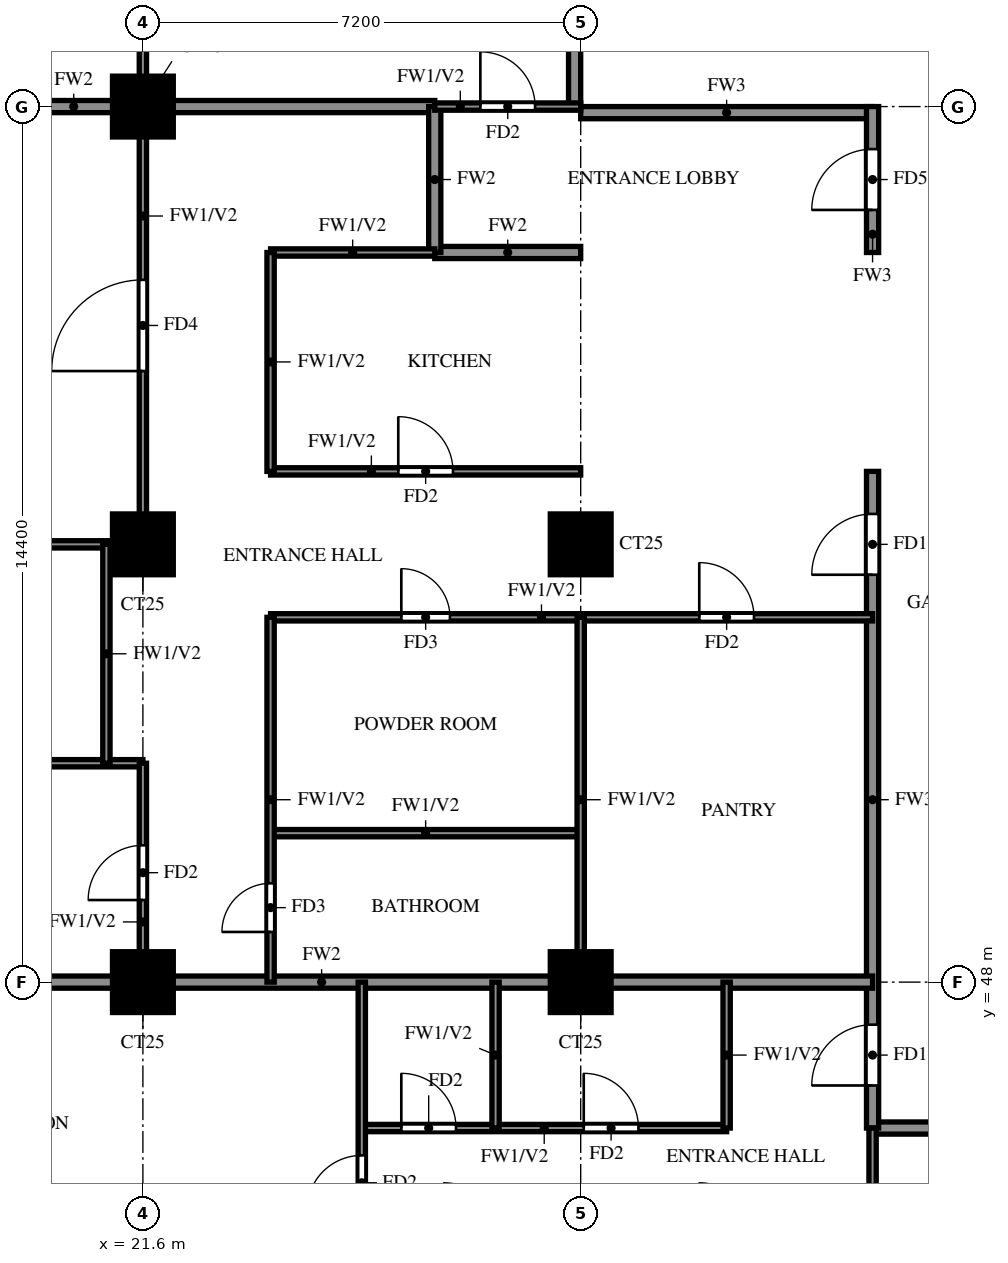
"""IFC4 building model, lengths in metres.
Left out: names, types, materials, properties, quantities, classifications, styles, units other than length and angle.
Written with IfcOpenShell. Run it as: python <this file> out.ifc"""

import sys

from ifc_helpers import new_model, si_unit, direction, frame, frame_2d, origin, origin_2d, place, context, subcontext, project, spatial, rectangle, extrude, source, transform, mapped, element, fill, save


model = new_model("IFC4")
c1 = context("Model", 3, precision=1e-05, world=origin(), true_north=direction((0.0, 1.0)))
c2 = subcontext(c1, "Body", "Model", "MODEL_VIEW")
j1 = project(units=[si_unit("LENGTHUNIT", "METRE"), si_unit("PLANEANGLEUNIT", "RADIAN")], contexts=[c1])
p1 = place(None, origin())
s1 = spatial("IfcSite", under=j1, at=p1, CompositionType="ELEMENT")
p2 = place(p1, origin())
s2 = spatial("IfcBuilding", under=s1, at=p2, CompositionType="ELEMENT")
p3 = place(p2, frame((0.0, 0.0, 171.0)))
s3 = spatial("IfcBuildingStorey", under=s2, at=p3, CompositionType="ELEMENT", Elevation=171.0)
m1 = source(origin(), c2, "Body", "SweptSolid", [
    extrude(rectangle(XDim=1.0, YDim=1.0, at=origin_2d()), origin(), (0.0, 0.0, 1.0), 3.2),
])
for number, where, z_axis, x_axis in (
    (1, (21.6, 48.0, 0.0), (0.0, 0.0, 1.0), (1.0, 0.0, 0.0)),
    (2, (28.8, 48.0, 0.0), (0.0, 0.0, 1.0), (1.0, 0.0, 0.0)),
    (3, (21.6, 55.2, 0.0), (0.0, 0.0, 1.0), (1.0, 0.0, 0.0)),
    (4, (28.8, 55.2, 0.0), (0.0, 0.0, 1.0), (1.0, 0.0, 0.0)),
    (5, (21.6, 62.4, 0.0), (0.0, 0.0, 1.0), (1.0, 0.0, 0.0)),
):
    element("IfcColumn", number, at=place(p3, frame(where, z_axis=z_axis, x_axis=x_axis)), inside=s3, PredefinedType="COLUMN", context=c2, shape_type="MappedRepresentation", body=[
        mapped(m1, transform((0.0, 0.0, 0.0))),
    ])
p4 = place(p3, frame((33.6, 45.6, 0.0), z_axis=(0.0, 0.0, 1.0), x_axis=(1.0, 0.0, 0.0)))
e6 = element("IfcWall", 6, at=p4, inside=s3, PredefinedType="SOLIDWALL", context=c2, shape_type="SweptSolid", body=[
    extrude(rectangle(XDim=7.2, YDim=0.2, at=frame_2d((3.6, 0.0))), origin(), (0.0, 0.0, 1.0), 3.2),
])
p5 = place(p4, frame((3.15, 0.0, 0.0)))
e7 = element("IfcOpeningElement", 7, at=p5, cuts=e6, PredefinedType="OPENING", context=c2, shape_type="SweptSolid", body=[
    extrude(rectangle(XDim=0.9, YDim=2.1, at=frame_2d((0.45, 1.05))), frame((0.0, 0.11, 0.0), z_axis=(0.0, -1.0, 0.0), x_axis=(1.0, 0.0, 0.0)), (0.0, 0.0, 1.0), 0.22),
])
p6 = place(p3, frame((28.8, 62.3, 0.0), z_axis=(0.0, 0.0, 1.0), x_axis=(1.0, 0.0, 0.0)))
e8 = element("IfcWall", 8, at=p6, inside=s3, PredefinedType="SOLIDWALL", context=c2, shape_type="SweptSolid", body=[
    extrude(rectangle(XDim=4.8, YDim=0.2, at=frame_2d((2.4, 0.0))), origin(), (0.0, 0.0, 1.0), 3.2),
])
p7 = place(p3, frame((28.7, 62.4, 0.0), z_axis=(0.0, 0.0, 1.0), x_axis=(0.0, 1.0, 0.0)))
e9 = element("IfcWall", 9, at=p7, inside=s3, PredefinedType="SOLIDWALL", context=c2, shape_type="SweptSolid", body=[
    extrude(rectangle(XDim=15.6, YDim=0.2, at=frame_2d((7.8, 0.0))), origin(), (0.0, 0.0, 1.0), 3.2),
])
p8 = place(p3, frame((33.6, 45.6, 0.0), z_axis=(0.0, 0.0, 1.0), x_axis=(0.0, 1.0, 0.0)))
e10 = element("IfcWall", 10, at=p8, inside=s3, PredefinedType="SOLIDWALL", context=c2, shape_type="SweptSolid", body=[
    extrude(rectangle(XDim=10.8, YDim=0.2, at=frame_2d((5.4, 0.0))), origin(), (0.0, 0.0, 1.0), 3.2),
])
p9 = place(p8, frame((0.7, 0.0, 0.0)))
e11 = element("IfcOpeningElement", 11, at=p9, cuts=e10, PredefinedType="OPENING", context=c2, shape_type="SweptSolid", body=[
    extrude(rectangle(XDim=1.0, YDim=2.1, at=frame_2d((0.5, 1.05))), frame((0.0, 0.11, 0.0), z_axis=(0.0, -1.0, 0.0), x_axis=(1.0, 0.0, 0.0)), (0.0, 0.0, 1.0), 0.22),
])
p10 = place(p8, frame((9.1, 0.0, 0.0)))
e12 = element("IfcOpeningElement", 12, at=p10, cuts=e10, PredefinedType="OPENING", context=c2, shape_type="SweptSolid", body=[
    extrude(rectangle(XDim=1.0, YDim=2.1, at=frame_2d((0.5, 1.05))), frame((0.0, 0.11, 0.0), z_axis=(0.0, -1.0, 0.0), x_axis=(1.0, 0.0, 0.0)), (0.0, 0.0, 1.0), 0.22),
])
p11 = place(p3, frame((33.6, 60.0, 0.0), z_axis=(0.0, 0.0, 1.0), x_axis=(0.0, 1.0, 0.0)))
e13 = element("IfcWall", 13, at=p11, inside=s3, PredefinedType="SOLIDWALL", context=c2, shape_type="SweptSolid", body=[
    extrude(rectangle(XDim=2.4, YDim=0.2, at=frame_2d((1.2, 0.0))), origin(), (0.0, 0.0, 1.0), 3.2),
])
p12 = place(p11, frame((0.7, 0.0, 0.0)))
e14 = element("IfcOpeningElement", 14, at=p12, cuts=e13, PredefinedType="OPENING", context=c2, shape_type="SweptSolid", body=[
    extrude(rectangle(XDim=1.0, YDim=2.1, at=frame_2d((0.5, 1.05))), frame((0.0, 0.11, 0.0), z_axis=(0.0, -1.0, 0.0), x_axis=(1.0, 0.0, 0.0)), (0.0, 0.0, 1.0), 0.22),
])
p13 = place(p3, frame((14.525, 48.0, 0.0), z_axis=(0.0, 0.0, 1.0), x_axis=(1.0, 0.0, 0.0)))
e15 = element("IfcWall", 15, at=p13, inside=s3, PredefinedType="SOLIDWALL", context=c2, shape_type="SweptSolid", body=[
    extrude(rectangle(XDim=19.075, YDim=0.2, at=frame_2d((9.538, 0.0))), origin(), (0.0, 0.0, 1.0), 3.2),
])
p14 = place(p3, frame((26.4, 60.0, 0.0), z_axis=(0.0, 0.0, 1.0), x_axis=(1.0, 0.0, 0.0)))
e16 = element("IfcWall", 16, at=p14, inside=s3, PredefinedType="SOLIDWALL", context=c2, shape_type="SweptSolid", body=[
    extrude(rectangle(XDim=2.4, YDim=0.2, at=frame_2d((1.2, 0.0))), origin(), (0.0, 0.0, 1.0), 3.2),
])
p15 = place(p3, frame((14.525, 62.4, 0.0), z_axis=(0.0, 0.0, 1.0), x_axis=(1.0, 0.0, 0.0)))
e17 = element("IfcWall", 17, at=p15, inside=s3, PredefinedType="SOLIDWALL", context=c2, shape_type="SweptSolid", body=[
    extrude(rectangle(XDim=11.875, YDim=0.2, at=frame_2d((5.938, 0.0))), origin(), (0.0, 0.0, 1.0), 3.2),
])
p16 = place(p3, frame((26.4, 60.0, 0.0), z_axis=(0.0, 0.0, 1.0), x_axis=(0.0, 1.0, 0.0)))
e18 = element("IfcWall", 18, at=p16, inside=s3, PredefinedType="SOLIDWALL", context=c2, shape_type="SweptSolid", body=[
    extrude(rectangle(XDim=2.4, YDim=0.2, at=frame_2d((1.2, 0.0))), origin(), (0.0, 0.0, 1.0), 3.2),
])
p17 = place(p3, frame((25.2, 45.6, 0.0), z_axis=(0.0, 0.0, 1.0), x_axis=(1.0, 0.0, 0.0)))
e19 = element("IfcWall", 19, at=p17, inside=s3, PredefinedType="PARTITIONING", context=c2, shape_type="SweptSolid", body=[
    extrude(rectangle(XDim=6.0, YDim=0.12, at=frame_2d((3.0, 0.0))), origin(), (0.0, 0.0, 1.0), 3.2),
])
p18 = place(p17, frame((0.65, 0.0, 0.0)))
e20 = element("IfcOpeningElement", 20, at=p18, cuts=e19, PredefinedType="OPENING", context=c2, shape_type="SweptSolid", body=[
    extrude(rectangle(XDim=0.9, YDim=2.1, at=frame_2d((0.45, 1.05))), frame((0.0, 0.07, 0.0), z_axis=(0.0, -1.0, 0.0), x_axis=(1.0, 0.0, 0.0)), (0.0, 0.0, 1.0), 0.14),
])
p19 = place(p17, frame((3.65, 0.0, 0.0)))
e21 = element("IfcOpeningElement", 21, at=p19, cuts=e19, PredefinedType="OPENING", context=c2, shape_type="SweptSolid", body=[
    extrude(rectangle(XDim=0.9, YDim=2.1, at=frame_2d((0.45, 1.05))), frame((0.0, 0.07, 0.0), z_axis=(0.0, -1.0, 0.0), x_axis=(1.0, 0.0, 0.0)), (0.0, 0.0, 1.0), 0.14),
])
p20 = place(p3, frame((23.7, 50.45, 0.0), z_axis=(0.0, 0.0, 1.0), x_axis=(1.0, 0.0, 0.0)))
e22 = element("IfcWall", 22, at=p20, inside=s3, PredefinedType="PARTITIONING", context=c2, shape_type="SweptSolid", body=[
    extrude(rectangle(XDim=5.1, YDim=0.12, at=frame_2d((2.55, 0.0))), origin(), (0.0, 0.0, 1.0), 3.2),
])
p21 = place(p3, frame((14.525, 51.6, 0.0), z_axis=(0.0, 0.0, 1.0), x_axis=(1.0, 0.0, 0.0)))
e23 = element("IfcWall", 23, at=p21, inside=s3, PredefinedType="PARTITIONING", context=c2, shape_type="SweptSolid", body=[
    extrude(rectangle(XDim=7.075, YDim=0.12, at=frame_2d((3.538, 0.0))), origin(), (0.0, 0.0, 1.0), 2.3),
])
p22 = place(p21, frame((2.837, 0.0, 0.0)))
e24 = element("IfcOpeningElement", 24, at=p22, cuts=e23, PredefinedType="OPENING", context=c2, shape_type="SweptSolid", body=[
    extrude(rectangle(XDim=0.8, YDim=2.1, at=frame_2d((0.4, 1.05))), frame((0.0, 0.07, 0.0), z_axis=(0.0, -1.0, 0.0), x_axis=(1.0, 0.0, 0.0)), (0.0, 0.0, 1.0), 0.14),
])
p23 = place(p3, frame((23.7, 54.0, 0.0), z_axis=(0.0, 0.0, 1.0), x_axis=(1.0, 0.0, 0.0)))
e25 = element("IfcWall", 25, at=p23, inside=s3, PredefinedType="PARTITIONING", context=c2, shape_type="SweptSolid", body=[
    extrude(rectangle(XDim=9.9, YDim=0.12, at=frame_2d((4.95, 0.0))), origin(), (0.0, 0.0, 1.0), 3.2),
])
p24 = place(p23, frame((2.15, 0.0, 0.0)))
e26 = element("IfcOpeningElement", 26, at=p24, cuts=e25, PredefinedType="OPENING", context=c2, shape_type="SweptSolid", body=[
    extrude(rectangle(XDim=0.8, YDim=2.1, at=frame_2d((0.4, 1.05))), frame((0.0, 0.07, 0.0), z_axis=(0.0, -1.0, 0.0), x_axis=(1.0, 0.0, 0.0)), (0.0, 0.0, 1.0), 0.14),
])
p25 = place(p23, frame((7.05, 0.0, 0.0)))
e27 = element("IfcOpeningElement", 27, at=p25, cuts=e25, PredefinedType="OPENING", context=c2, shape_type="SweptSolid", body=[
    extrude(rectangle(XDim=0.9, YDim=2.1, at=frame_2d((0.45, 1.05))), frame((0.0, 0.07, 0.0), z_axis=(0.0, -1.0, 0.0), x_axis=(1.0, 0.0, 0.0)), (0.0, 0.0, 1.0), 0.14),
])
p26 = place(p3, frame((14.525, 55.2, 0.0), z_axis=(0.0, 0.0, 1.0), x_axis=(1.0, 0.0, 0.0)))
e28 = element("IfcWall", 28, at=p26, inside=s3, PredefinedType="PARTITIONING", context=c2, shape_type="SweptSolid", body=[
    extrude(rectangle(XDim=7.075, YDim=0.12, at=frame_2d((3.538, 0.0))), origin(), (0.0, 0.0, 1.0), 3.2),
])
p27 = place(p3, frame((23.7, 56.4, 0.0), z_axis=(0.0, 0.0, 1.0), x_axis=(1.0, 0.0, 0.0)))
e29 = element("IfcWall", 29, at=p27, inside=s3, PredefinedType="PARTITIONING", context=c2, shape_type="SweptSolid", body=[
    extrude(rectangle(XDim=5.1, YDim=0.12, at=frame_2d((2.55, 0.0))), origin(), (0.0, 0.0, 1.0), 3.2),
])
p28 = place(p27, frame((2.1, 0.0, 0.0)))
e30 = element("IfcOpeningElement", 30, at=p28, cuts=e29, PredefinedType="OPENING", context=c2, shape_type="SweptSolid", body=[
    extrude(rectangle(XDim=0.9, YDim=2.1, at=frame_2d((0.45, 1.05))), frame((0.0, 0.07, 0.0), z_axis=(0.0, -1.0, 0.0), x_axis=(1.0, 0.0, 0.0)), (0.0, 0.0, 1.0), 0.14),
])
p29 = place(p3, frame((23.7, 60.0, 0.0), z_axis=(0.0, 0.0, 1.0), x_axis=(1.0, 0.0, 0.0)))
e31 = element("IfcWall", 31, at=p29, inside=s3, PredefinedType="PARTITIONING", context=c2, shape_type="SweptSolid", body=[
    extrude(rectangle(XDim=2.7, YDim=0.12, at=frame_2d((1.35, 0.0))), origin(), (0.0, 0.0, 1.0), 3.2),
])
p30 = place(p3, frame((26.4, 62.4, 0.0), z_axis=(0.0, 0.0, 1.0), x_axis=(1.0, 0.0, 0.0)))
e32 = element("IfcWall", 32, at=p30, inside=s3, PredefinedType="PARTITIONING", context=c2, shape_type="SweptSolid", body=[
    extrude(rectangle(XDim=2.4, YDim=0.12, at=frame_2d((1.2, 0.0))), origin(), (0.0, 0.0, 1.0), 3.2),
])
p31 = place(p30, frame((0.75, 0.0, 0.0)))
e33 = element("IfcOpeningElement", 33, at=p31, cuts=e32, PredefinedType="OPENING", context=c2, shape_type="SweptSolid", body=[
    extrude(rectangle(XDim=0.9, YDim=2.1, at=frame_2d((0.45, 1.05))), frame((0.0, 0.07, 0.0), z_axis=(0.0, -1.0, 0.0), x_axis=(1.0, 0.0, 0.0)), (0.0, 0.0, 1.0), 0.14),
])
p32 = place(p3, frame((21.0, 51.6, 0.0), z_axis=(0.0, 0.0, 1.0), x_axis=(0.0, 1.0, 0.0)))
e34 = element("IfcWall", 34, at=p32, inside=s3, PredefinedType="PARTITIONING", context=c2, shape_type="SweptSolid", body=[
    extrude(rectangle(XDim=3.6, YDim=0.12, at=frame_2d((1.8, 0.0))), origin(), (0.0, 0.0, 1.0), 3.2),
])
p33 = place(p3, frame((21.6, 48.0, 0.0), z_axis=(0.0, 0.0, 1.0), x_axis=(0.0, 1.0, 0.0)))
e35 = element("IfcWall", 35, at=p33, inside=s3, PredefinedType="PARTITIONING", context=c2, shape_type="SweptSolid", body=[
    extrude(rectangle(XDim=3.6, YDim=0.12, at=frame_2d((1.8, 0.0))), origin(), (0.0, 0.0, 1.0), 3.2),
])
p34 = place(p33, frame((1.35, 0.0, 0.0)))
e36 = element("IfcOpeningElement", 36, at=p34, cuts=e35, PredefinedType="OPENING", context=c2, shape_type="SweptSolid", body=[
    extrude(rectangle(XDim=0.9, YDim=2.1, at=frame_2d((0.45, 1.05))), frame((0.0, 0.07, 0.0), z_axis=(0.0, -1.0, 0.0), x_axis=(1.0, 0.0, 0.0)), (0.0, 0.0, 1.0), 0.14),
])
p35 = place(p3, frame((21.6, 55.2, 0.0), z_axis=(0.0, 0.0, 1.0), x_axis=(0.0, 1.0, 0.0)))
e37 = element("IfcWall", 37, at=p35, inside=s3, PredefinedType="PARTITIONING", context=c2, shape_type="SweptSolid", body=[
    extrude(rectangle(XDim=10.8, YDim=0.12, at=frame_2d((5.4, 0.0))), origin(), (0.0, 0.0, 1.0), 3.2),
])
p36 = place(p35, frame((2.85, 0.0, 0.0)))
e38 = element("IfcOpeningElement", 38, at=p36, cuts=e37, PredefinedType="OPENING", context=c2, shape_type="SweptSolid", body=[
    extrude(rectangle(XDim=1.5, YDim=2.1, at=frame_2d((0.75, 1.05))), frame((0.0, 0.07, 0.0), z_axis=(0.0, -1.0, 0.0), x_axis=(1.0, 0.0, 0.0)), (0.0, 0.0, 1.0), 0.14),
])
p37 = place(p35, frame((8.55, 0.0, 0.0)))
e39 = element("IfcOpeningElement", 39, at=p37, cuts=e37, PredefinedType="OPENING", context=c2, shape_type="SweptSolid", body=[
    extrude(rectangle(XDim=0.9, YDim=2.1, at=frame_2d((0.45, 1.05))), frame((0.0, 0.07, 0.0), z_axis=(0.0, -1.0, 0.0), x_axis=(1.0, 0.0, 0.0)), (0.0, 0.0, 1.0), 0.14),
])
p38 = place(p3, frame((23.7, 48.0, 0.0), z_axis=(0.0, 0.0, 1.0), x_axis=(0.0, 1.0, 0.0)))
e40 = element("IfcWall", 40, at=p38, inside=s3, PredefinedType="PARTITIONING", context=c2, shape_type="SweptSolid", body=[
    extrude(rectangle(XDim=6.0, YDim=0.12, at=frame_2d((3.0, 0.0))), origin(), (0.0, 0.0, 1.0), 3.2),
])
p39 = place(p38, frame((0.825, 0.0, 0.0)))
e41 = element("IfcOpeningElement", 41, at=p39, cuts=e40, PredefinedType="OPENING", context=c2, shape_type="SweptSolid", body=[
    extrude(rectangle(XDim=0.8, YDim=2.1, at=frame_2d((0.4, 1.05))), frame((0.0, 0.07, 0.0), z_axis=(0.0, -1.0, 0.0), x_axis=(1.0, 0.0, 0.0)), (0.0, 0.0, 1.0), 0.14),
])
p40 = place(p3, frame((23.7, 56.4, 0.0), z_axis=(0.0, 0.0, 1.0), x_axis=(0.0, 1.0, 0.0)))
e42 = element("IfcWall", 42, at=p40, inside=s3, PredefinedType="PARTITIONING", context=c2, shape_type="SweptSolid", body=[
    extrude(rectangle(XDim=3.6, YDim=0.12, at=frame_2d((1.8, 0.0))), origin(), (0.0, 0.0, 1.0), 3.2),
])
p41 = place(p3, frame((25.2, 39.725, 0.0), z_axis=(0.0, 0.0, 1.0), x_axis=(0.0, 1.0, 0.0)))
e43 = element("IfcWall", 43, at=p41, inside=s3, PredefinedType="PARTITIONING", context=c2, shape_type="SweptSolid", body=[
    extrude(rectangle(XDim=8.275, YDim=0.12, at=frame_2d((4.137, 0.0))), origin(), (0.0, 0.0, 1.0), 3.2),
])
p42 = place(p41, frame((4.525, 0.0, 0.0)))
e44 = element("IfcOpeningElement", 44, at=p42, cuts=e43, PredefinedType="OPENING", context=c2, shape_type="SweptSolid", body=[
    extrude(rectangle(XDim=0.9, YDim=2.1, at=frame_2d((0.45, 1.05))), frame((0.0, 0.07, 0.0), z_axis=(0.0, -1.0, 0.0), x_axis=(1.0, 0.0, 0.0)), (0.0, 0.0, 1.0), 0.14),
])
p43 = place(p3, frame((27.4, 45.6, 0.0), z_axis=(0.0, 0.0, 1.0), x_axis=(0.0, 1.0, 0.0)))
e45 = element("IfcWall", 45, at=p43, inside=s3, PredefinedType="PARTITIONING", context=c2, shape_type="SweptSolid", body=[
    extrude(rectangle(XDim=2.4, YDim=0.12, at=frame_2d((1.2, 0.0))), origin(), (0.0, 0.0, 1.0), 3.2),
])
p44 = place(p3, frame((28.8, 48.0, 0.0), z_axis=(0.0, 0.0, 1.0), x_axis=(0.0, 1.0, 0.0)))
e46 = element("IfcWall", 46, at=p44, inside=s3, PredefinedType="PARTITIONING", context=c2, shape_type="SweptSolid", body=[
    extrude(rectangle(XDim=6.0, YDim=0.12, at=frame_2d((3.0, 0.0))), origin(), (0.0, 0.0, 1.0), 3.2),
])
p45 = place(p3, frame((31.2, 45.6, 0.0), z_axis=(0.0, 0.0, 1.0), x_axis=(0.0, 1.0, 0.0)))
e47 = element("IfcWall", 47, at=p45, inside=s3, PredefinedType="PARTITIONING", context=c2, shape_type="SweptSolid", body=[
    extrude(rectangle(XDim=2.4, YDim=0.12, at=frame_2d((1.2, 0.0))), origin(), (0.0, 0.0, 1.0), 3.2),
])
p46 = place(p3, frame((33.6, 39.725, 0.0), z_axis=(0.0, 0.0, 1.0), x_axis=(0.0, 1.0, 0.0)))
e48 = element("IfcWall", 48, at=p46, inside=s3, PredefinedType="PARTITIONING", context=c2, shape_type="SweptSolid", body=[
    extrude(rectangle(XDim=5.875, YDim=0.12, at=frame_2d((2.938, 0.0))), origin(), (0.0, 0.0, 1.0), 3.2),
])
p47 = place(p9, origin())
e49 = element("IfcDoor", 49, at=p47, inside=s3, OperationType="SINGLE_SWING_RIGHT", PredefinedType="DOOR", context=c2, shape_type="SweptSolid", body=[
    extrude(rectangle(XDim=1.0, YDim=2.1, at=frame_2d((0.5, 1.05))), frame((0.0, 0.025, 0.0), z_axis=(0.0, -1.0, 0.0), x_axis=(1.0, 0.0, 0.0)), (0.0, 0.0, 1.0), 0.05),
])
fill(e11, e49)
p48 = place(p42, origin())
e50 = element("IfcDoor", 50, at=p48, inside=s3, OperationType="SINGLE_SWING_LEFT", PredefinedType="DOOR", context=c2, shape_type="SweptSolid", body=[
    extrude(rectangle(XDim=0.9, YDim=2.1, at=frame_2d((0.45, 1.05))), frame((0.0, 0.025, 0.0), z_axis=(0.0, -1.0, 0.0), x_axis=(1.0, 0.0, 0.0)), (0.0, 0.0, 1.0), 0.05),
])
fill(e44, e50)
p49 = place(p18, origin())
e51 = element("IfcDoor", 51, at=p49, inside=s3, OperationType="SINGLE_SWING_LEFT", PredefinedType="DOOR", context=c2, shape_type="SweptSolid", body=[
    extrude(rectangle(XDim=0.9, YDim=2.1, at=frame_2d((0.45, 1.05))), frame((0.0, 0.025, 0.0), z_axis=(0.0, -1.0, 0.0), x_axis=(1.0, 0.0, 0.0)), (0.0, 0.0, 1.0), 0.05),
])
fill(e20, e51)
p50 = place(p19, origin())
e52 = element("IfcDoor", 52, at=p50, inside=s3, OperationType="SINGLE_SWING_LEFT", PredefinedType="DOOR", context=c2, shape_type="SweptSolid", body=[
    extrude(rectangle(XDim=0.9, YDim=2.1, at=frame_2d((0.45, 1.05))), frame((0.0, 0.025, 0.0), z_axis=(0.0, -1.0, 0.0), x_axis=(1.0, 0.0, 0.0)), (0.0, 0.0, 1.0), 0.05),
])
fill(e21, e52)
p51 = place(p10, origin())
e53 = element("IfcDoor", 53, at=p51, inside=s3, OperationType="SINGLE_SWING_LEFT", PredefinedType="DOOR", context=c2, shape_type="SweptSolid", body=[
    extrude(rectangle(XDim=1.0, YDim=2.1, at=frame_2d((0.5, 1.05))), frame((0.0, 0.025, 0.0), z_axis=(0.0, -1.0, 0.0), x_axis=(1.0, 0.0, 0.0)), (0.0, 0.0, 1.0), 0.05),
])
fill(e12, e53)
p52 = place(p34, origin())
e54 = element("IfcDoor", 54, at=p52, inside=s3, OperationType="SINGLE_SWING_LEFT", PredefinedType="DOOR", context=c2, shape_type="SweptSolid", body=[
    extrude(rectangle(XDim=0.9, YDim=2.1, at=frame_2d((0.45, 1.05))), frame((0.0, 0.025, 0.0), z_axis=(0.0, -1.0, 0.0), x_axis=(1.0, 0.0, 0.0)), (0.0, 0.0, 1.0), 0.05),
])
fill(e36, e54)
p53 = place(p36, origin())
e55 = element("IfcDoor", 55, at=p53, inside=s3, OperationType="SINGLE_SWING_LEFT", PredefinedType="DOOR", context=c2, shape_type="SweptSolid", body=[
    extrude(rectangle(XDim=1.5, YDim=2.1, at=frame_2d((0.75, 1.05))), frame((0.0, 0.025, 0.0), z_axis=(0.0, -1.0, 0.0), x_axis=(1.0, 0.0, 0.0)), (0.0, 0.0, 1.0), 0.05),
])
fill(e38, e55)
p54 = place(p39, origin())
e56 = element("IfcDoor", 56, at=p54, inside=s3, OperationType="SINGLE_SWING_LEFT", PredefinedType="DOOR", context=c2, shape_type="SweptSolid", body=[
    extrude(rectangle(XDim=0.8, YDim=2.1, at=frame_2d((0.4, 1.05))), frame((0.0, 0.025, 0.0), z_axis=(0.0, -1.0, 0.0), x_axis=(1.0, 0.0, 0.0)), (0.0, 0.0, 1.0), 0.05),
])
fill(e41, e56)
p55 = place(p24, origin())
e57 = element("IfcDoor", 57, at=p55, inside=s3, OperationType="SINGLE_SWING_RIGHT", PredefinedType="DOOR", context=c2, shape_type="SweptSolid", body=[
    extrude(rectangle(XDim=0.8, YDim=2.1, at=frame_2d((0.4, 1.05))), frame((0.0, 0.025, 0.0), z_axis=(0.0, -1.0, 0.0), x_axis=(1.0, 0.0, 0.0)), (0.0, 0.0, 1.0), 0.05),
])
fill(e26, e57)
p56 = place(p28, origin())
e58 = element("IfcDoor", 58, at=p56, inside=s3, OperationType="SINGLE_SWING_LEFT", PredefinedType="DOOR", context=c2, shape_type="SweptSolid", body=[
    extrude(rectangle(XDim=0.9, YDim=2.1, at=frame_2d((0.45, 1.05))), frame((0.0, 0.025, 0.0), z_axis=(0.0, -1.0, 0.0), x_axis=(1.0, 0.0, 0.0)), (0.0, 0.0, 1.0), 0.05),
])
fill(e30, e58)
p57 = place(p25, origin())
e59 = element("IfcDoor", 59, at=p57, inside=s3, OperationType="SINGLE_SWING_LEFT", PredefinedType="DOOR", context=c2, shape_type="SweptSolid", body=[
    extrude(rectangle(XDim=0.9, YDim=2.1, at=frame_2d((0.45, 1.05))), frame((0.0, 0.025, 0.0), z_axis=(0.0, -1.0, 0.0), x_axis=(1.0, 0.0, 0.0)), (0.0, 0.0, 1.0), 0.05),
])
fill(e27, e59)
p58 = place(p31, origin())
e60 = element("IfcDoor", 60, at=p58, inside=s3, OperationType="SINGLE_SWING_RIGHT", PredefinedType="DOOR", context=c2, shape_type="SweptSolid", body=[
    extrude(rectangle(XDim=0.9, YDim=2.1, at=frame_2d((0.45, 1.05))), frame((0.0, 0.025, 0.0), z_axis=(0.0, -1.0, 0.0), x_axis=(1.0, 0.0, 0.0)), (0.0, 0.0, 1.0), 0.05),
])
fill(e33, e60)
p59 = place(p12, origin())
e61 = element("IfcDoor", 61, at=p59, inside=s3, OperationType="SINGLE_SWING_LEFT", PredefinedType="DOOR", context=c2, shape_type="SweptSolid", body=[
    extrude(rectangle(XDim=1.0, YDim=2.1, at=frame_2d((0.5, 1.05))), frame((0.0, 0.025, 0.0), z_axis=(0.0, -1.0, 0.0), x_axis=(1.0, 0.0, 0.0)), (0.0, 0.0, 1.0), 0.05),
])
fill(e14, e61)
save(model, sys.argv[1])
